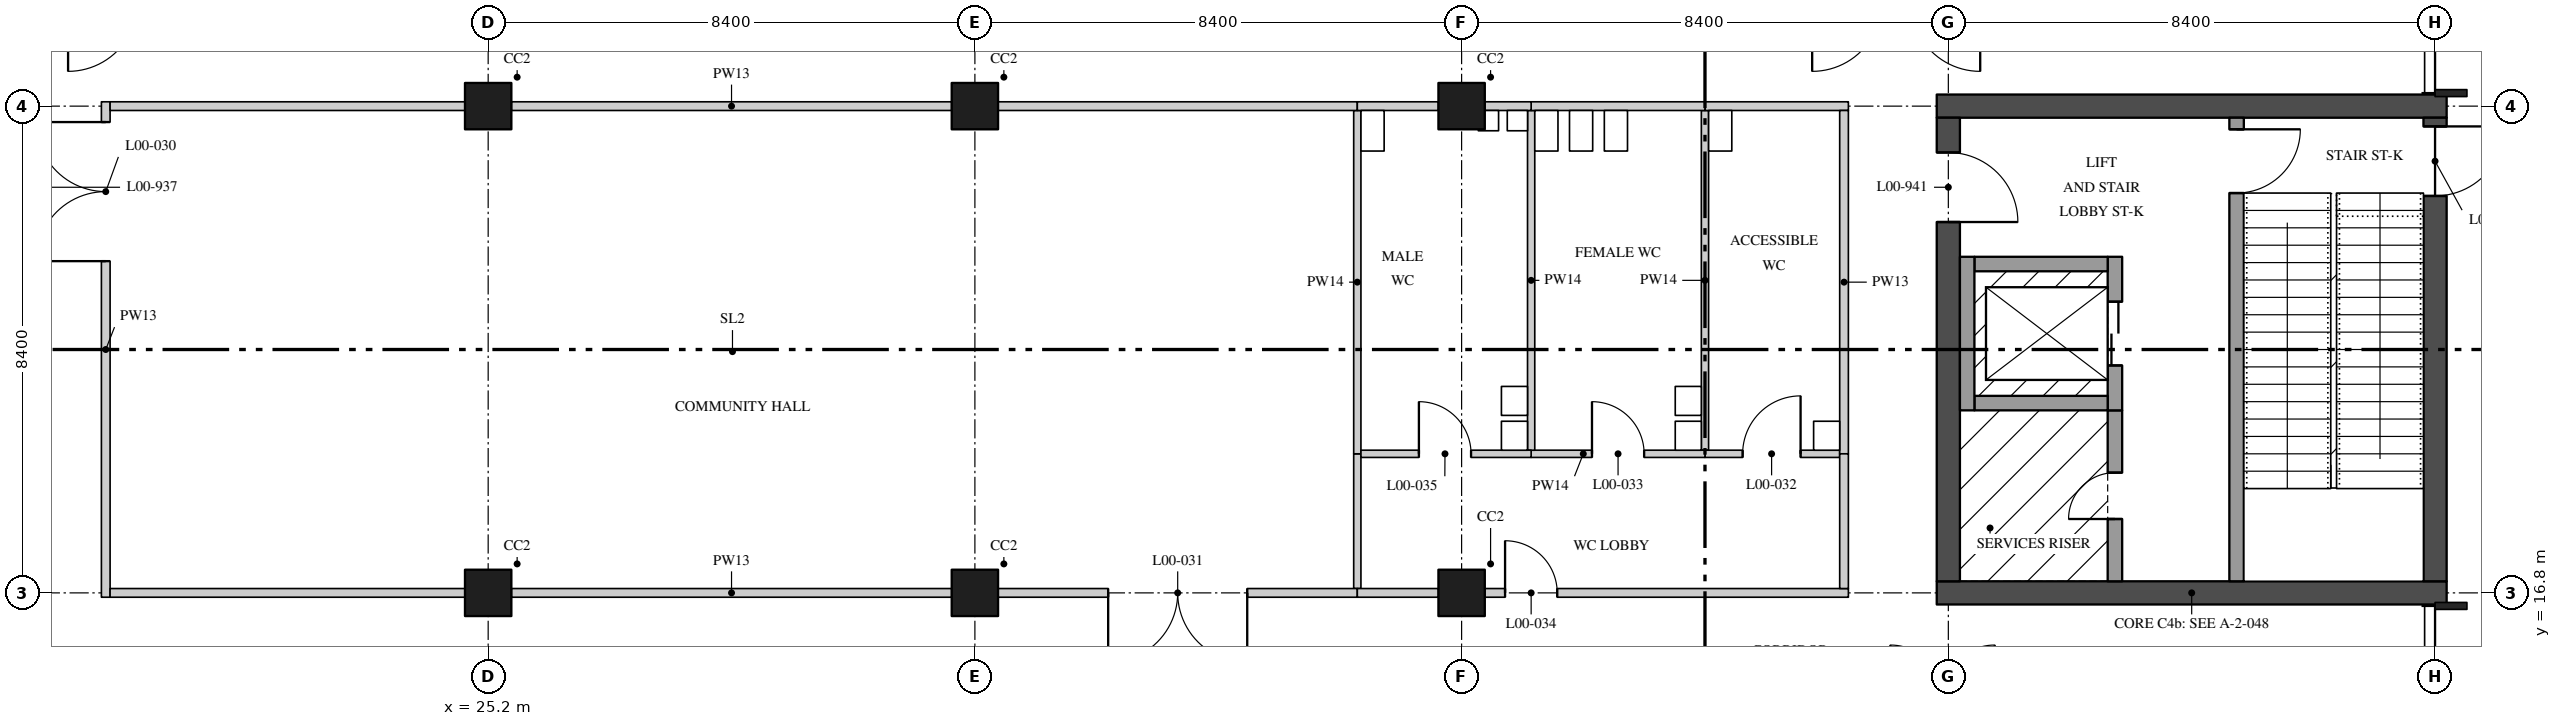
"""IFC4 building model, lengths in metres.
Left out: names, types, materials, properties, quantities, classifications, styles, units other than length and angle.
Written with IfcOpenShell. Run it as: python <this file> out.ifc"""

import sys

from ifc_helpers import new_model, si_unit, direction, frame, frame_2d, origin, origin_2d, place, context, subcontext, project, spatial, rectangle, extrude, element, fill, save


model = new_model("IFC4")
c1 = context("Model", 3, precision=1e-05, world=origin(), true_north=direction((0.0, 1.0)))
c2 = subcontext(c1, "Body", "Model", "MODEL_VIEW")
j1 = project(units=[si_unit("LENGTHUNIT", "METRE"), si_unit("PLANEANGLEUNIT", "RADIAN")], contexts=[c1])
p1 = place(None, origin())
s1 = spatial("IfcSite", under=j1, at=p1, CompositionType="ELEMENT")
p2 = place(p1, origin())
s2 = spatial("IfcBuilding", under=s1, at=p2, CompositionType="ELEMENT")
p3 = place(p2, origin())
s3 = spatial("IfcBuildingStorey", under=s2, at=p3, CompositionType="ELEMENT", Elevation=0.0)
for number, where, z_axis, x_axis in (
    (1, (25.2, 16.8, 0.0), (0.0, 0.0, 1.0), (1.0, 0.0, 0.0)),
    (2, (25.2, 25.2, 0.0), (0.0, 0.0, 1.0), (1.0, 0.0, 0.0)),
    (3, (33.6, 16.8, 0.0), (0.0, 0.0, 1.0), (1.0, 0.0, 0.0)),
    (4, (33.6, 25.2, 0.0), (0.0, 0.0, 1.0), (1.0, 0.0, 0.0)),
    (5, (42.0, 16.8, 0.0), (0.0, 0.0, 1.0), (1.0, 0.0, 0.0)),
    (6, (42.0, 25.2, 0.0), (0.0, 0.0, 1.0), (1.0, 0.0, 0.0)),
):
    element("IfcColumn", number, at=place(p3, frame(where, z_axis=z_axis, x_axis=x_axis)), inside=s3, PredefinedType="COLUMN", context=c2, shape_type="SweptSolid", body=[
        extrude(rectangle(XDim=0.8, YDim=0.8, at=origin_2d()), origin(), (0.0, 0.0, 1.0), 5.05),
    ])
for number, where, z_axis, x_axis in (
    (7, (50.2, 16.8, 0.0), (0.0, 0.0, 1.0), (1.0, 0.0, 0.0)),
    (8, (50.2, 25.2, 0.0), (0.0, 0.0, 1.0), (1.0, 0.0, 0.0)),
):
    element("IfcWall", number, at=place(p3, frame(where, z_axis=z_axis, x_axis=x_axis)), inside=s3, PredefinedType="SHEAR", context=c2, shape_type="SweptSolid", body=[
        extrude(rectangle(XDim=8.8, YDim=0.4, at=frame_2d((4.4, 0.0))), origin(), (0.0, 0.0, 1.0), 5.05),
    ])
p4 = place(p3, frame((50.4, 17.0, 0.0), z_axis=(0.0, 0.0, 1.0), x_axis=(0.0, 1.0, 0.0)))
e9 = element("IfcWall", 9, at=p4, inside=s3, PredefinedType="SHEAR", context=c2, shape_type="SweptSolid", body=[
    extrude(rectangle(XDim=8.0, YDim=0.4, at=frame_2d((4.0, 0.0))), origin(), (0.0, 0.0, 1.0), 5.05),
])
p5 = place(p4, frame((6.2, 0.0, 0.0)))
e10 = element("IfcOpeningElement", 10, at=p5, cuts=e9, PredefinedType="OPENING", context=c2, shape_type="SweptSolid", body=[
    extrude(rectangle(XDim=1.2, YDim=2.1, at=frame_2d((0.6, 1.05))), frame((0.0, 0.21, 0.0), z_axis=(0.0, -1.0, 0.0), x_axis=(1.0, 0.0, 0.0)), (0.0, 0.0, 1.0), 0.42),
])
p6 = place(p3, frame((58.8, 17.0, 0.0), z_axis=(0.0, 0.0, 1.0), x_axis=(0.0, 1.0, 0.0)))
e11 = element("IfcWall", 11, at=p6, inside=s3, PredefinedType="SHEAR", context=c2, shape_type="SweptSolid", body=[
    extrude(rectangle(XDim=8.0, YDim=0.4, at=frame_2d((4.0, 0.0))), origin(), (0.0, 0.0, 1.0), 5.05),
])
p7 = place(p6, frame((6.65, 0.0, 0.0)))
e12 = element("IfcOpeningElement", 12, at=p7, cuts=e11, PredefinedType="OPENING", context=c2, shape_type="SweptSolid", body=[
    extrude(rectangle(XDim=1.2, YDim=2.1, at=frame_2d((0.6, 1.05))), frame((0.0, 0.21, 0.0), z_axis=(0.0, -1.0, 0.0), x_axis=(1.0, 0.0, 0.0)), (0.0, 0.0, 1.0), 0.42),
])
p8 = place(p3, frame((55.375, 25.0, 0.0), z_axis=(0.0, 0.0, 1.0), x_axis=(0.0, -1.0, 0.0)))
e13 = element("IfcWall", 13, at=p8, inside=s3, PredefinedType="SOLIDWALL", context=c2, shape_type="SweptSolid", body=[
    extrude(rectangle(XDim=8.0, YDim=0.25, at=frame_2d((4.0, 0.0))), origin(), (0.0, 0.0, 1.0), 5.05),
])
p9 = place(p8, frame((0.2, 0.0, 0.0)))
e14 = element("IfcOpeningElement", 14, at=p9, cuts=e13, PredefinedType="OPENING", context=c2, shape_type="SweptSolid", body=[
    extrude(rectangle(XDim=1.1, YDim=2.1, at=frame_2d((0.55, 1.05))), frame((0.0, 0.135, 0.0), z_axis=(0.0, -1.0, 0.0), x_axis=(1.0, 0.0, 0.0)), (0.0, 0.0, 1.0), 0.27),
])
p10 = place(p3, frame((53.275, 19.95, 0.0), z_axis=(0.0, 0.0, 1.0), x_axis=(0.0, -1.0, 0.0)))
e15 = element("IfcWall", 15, at=p10, inside=s3, PredefinedType="SOLIDWALL", context=c2, shape_type="SweptSolid", body=[
    extrude(rectangle(XDim=2.95, YDim=0.25, at=frame_2d((1.475, 0.0))), origin(), (0.0, 0.0, 1.0), 5.05),
])
p11 = place(p10, frame((1.075, 0.0, 0.0)))
e16 = element("IfcOpeningElement", 16, at=p11, cuts=e15, PredefinedType="OPENING", context=c2, shape_type="SweptSolid", body=[
    extrude(rectangle(XDim=0.8, YDim=2.1, at=frame_2d((0.4, 1.05))), frame((0.0, 0.135, 0.0), z_axis=(0.0, -1.0, 0.0), x_axis=(1.0, 0.0, 0.0)), (0.0, 0.0, 1.0), 0.27),
])
p12 = place(p3, frame((53.275, 19.95, 0.0), z_axis=(0.0, 0.0, 1.0), x_axis=(0.0, 1.0, 0.0)))
e17 = element("IfcWall", 17, at=p12, inside=s3, PredefinedType="SOLIDWALL", context=c2, shape_type="SweptSolid", body=[
    extrude(rectangle(XDim=2.65, YDim=0.25, at=frame_2d((1.325, 0.0))), origin(), (0.0, 0.0, 1.0), 5.05),
])
p13 = place(p12, frame((0.775, 0.0, 0.0)))
e18 = element("IfcOpeningElement", 18, at=p13, cuts=e17, PredefinedType="OPENING", context=c2, shape_type="SweptSolid", body=[
    extrude(rectangle(XDim=1.1, YDim=2.1, at=frame_2d((0.55, 1.05))), frame((0.0, 0.135, 0.0), z_axis=(0.0, -1.0, 0.0), x_axis=(1.0, 0.0, 0.0)), (0.0, 0.0, 1.0), 0.27),
])
for number, where, z_axis, x_axis in (
    (19, (50.85, 22.475, 0.0), (0.0, 0.0, 1.0), (1.0, 0.0, 0.0)),
    (20, (50.85, 20.075, 0.0), (0.0, 0.0, 1.0), (1.0, 0.0, 0.0)),
):
    element("IfcWall", number, at=place(p3, frame(where, z_axis=z_axis, x_axis=x_axis)), inside=s3, PredefinedType="SOLIDWALL", context=c2, shape_type="SweptSolid", body=[
        extrude(rectangle(XDim=2.3, YDim=0.25, at=frame_2d((1.15, 0.0))), origin(), (0.0, 0.0, 1.0), 5.05),
    ])
p14 = place(p3, frame((50.725, 19.95, 0.0), z_axis=(0.0, 0.0, 1.0), x_axis=(0.0, 1.0, 0.0)))
e21 = element("IfcWall", 21, at=p14, inside=s3, PredefinedType="SOLIDWALL", context=c2, shape_type="SweptSolid", body=[
    extrude(rectangle(XDim=2.65, YDim=0.25, at=frame_2d((1.325, 0.0))), origin(), (0.0, 0.0, 1.0), 5.05),
])
p15 = place(p3, frame((40.2, 16.875, 0.0), z_axis=(0.0, 0.0, 1.0), x_axis=(0.0, 1.0, 0.0)))
e22 = element("IfcWall", 22, at=p15, inside=s3, PredefinedType="PARTITIONING", context=c2, shape_type="SweptSolid", body=[
    extrude(rectangle(XDim=2.325, YDim=0.125, at=frame_2d((1.163, 0.0))), origin(), (0.0, 0.0, 1.0), 5.05),
])
p16 = place(p3, frame((40.2, 19.2, 0.0), z_axis=(0.0, 0.0, 1.0), x_axis=(0.0, 1.0, 0.0)))
e23 = element("IfcWall", 23, at=p16, inside=s3, PredefinedType="PARTITIONING", context=c2, shape_type="SweptSolid", body=[
    extrude(rectangle(XDim=5.925, YDim=0.125, at=frame_2d((2.962, 0.0))), origin(), (0.0, 0.0, 1.0), 5.05),
])
p17 = place(p3, frame((18.6, 16.725, 0.0), z_axis=(0.0, 0.0, 1.0), x_axis=(0.0, 1.0, 0.0)))
e24 = element("IfcWall", 24, at=p17, inside=s3, PredefinedType="PARTITIONING", context=c2, shape_type="SweptSolid", body=[
    extrude(rectangle(XDim=8.55, YDim=0.15, at=frame_2d((4.275, 0.0))), origin(), (0.0, 0.0, 1.0), 5.05),
])
p18 = place(p17, frame((5.8, 0.0, 0.0)))
e25 = element("IfcOpeningElement", 25, at=p18, cuts=e24, PredefinedType="OPENING", context=c2, shape_type="SweptSolid", body=[
    extrude(rectangle(XDim=2.4, YDim=2.7, at=frame_2d((1.2, 1.35))), frame((0.0, 0.085, 0.0), z_axis=(0.0, -1.0, 0.0), x_axis=(1.0, 0.0, 0.0)), (0.0, 0.0, 1.0), 0.17),
])
p19 = place(p3, frame((18.675, 16.8, 0.0), z_axis=(0.0, 0.0, 1.0), x_axis=(1.0, 0.0, 0.0)))
e26 = element("IfcWall", 26, at=p19, inside=s3, PredefinedType="PARTITIONING", context=c2, shape_type="SweptSolid", body=[
    extrude(rectangle(XDim=6.125, YDim=0.15, at=frame_2d((3.062, 0.0))), origin(), (0.0, 0.0, 1.0), 5.05),
])
p20 = place(p3, frame((25.6, 16.8, 0.0), z_axis=(0.0, 0.0, 1.0), x_axis=(1.0, 0.0, 0.0)))
e27 = element("IfcWall", 27, at=p20, inside=s3, PredefinedType="PARTITIONING", context=c2, shape_type="SweptSolid", body=[
    extrude(rectangle(XDim=7.6, YDim=0.15, at=frame_2d((3.8, 0.0))), origin(), (0.0, 0.0, 1.0), 5.05),
])
p21 = place(p3, frame((34.0, 16.8, 0.0), z_axis=(0.0, 0.0, 1.0), x_axis=(1.0, 0.0, 0.0)))
e28 = element("IfcWall", 28, at=p21, inside=s3, PredefinedType="PARTITIONING", context=c2, shape_type="SweptSolid", body=[
    extrude(rectangle(XDim=6.2, YDim=0.15, at=frame_2d((3.1, 0.0))), origin(), (0.0, 0.0, 1.0), 5.05),
])
p22 = place(p21, frame((1.9, 0.0, 0.0)))
e29 = element("IfcOpeningElement", 29, at=p22, cuts=e28, PredefinedType="OPENING", context=c2, shape_type="SweptSolid", body=[
    extrude(rectangle(XDim=2.4, YDim=2.7, at=frame_2d((1.2, 1.35))), frame((0.0, 0.085, 0.0), z_axis=(0.0, -1.0, 0.0), x_axis=(1.0, 0.0, 0.0)), (0.0, 0.0, 1.0), 0.17),
])
p23 = place(p3, frame((18.675, 25.2, 0.0), z_axis=(0.0, 0.0, 1.0), x_axis=(1.0, 0.0, 0.0)))
e30 = element("IfcWall", 30, at=p23, inside=s3, PredefinedType="PARTITIONING", context=c2, shape_type="SweptSolid", body=[
    extrude(rectangle(XDim=6.125, YDim=0.15, at=frame_2d((3.062, 0.0))), origin(), (0.0, 0.0, 1.0), 5.05),
])
p24 = place(p3, frame((25.6, 25.2, 0.0), z_axis=(0.0, 0.0, 1.0), x_axis=(1.0, 0.0, 0.0)))
e31 = element("IfcWall", 31, at=p24, inside=s3, PredefinedType="PARTITIONING", context=c2, shape_type="SweptSolid", body=[
    extrude(rectangle(XDim=7.6, YDim=0.15, at=frame_2d((3.8, 0.0))), origin(), (0.0, 0.0, 1.0), 5.05),
])
p25 = place(p3, frame((34.0, 25.2, 0.0), z_axis=(0.0, 0.0, 1.0), x_axis=(1.0, 0.0, 0.0)))
e32 = element("IfcWall", 32, at=p25, inside=s3, PredefinedType="PARTITIONING", context=c2, shape_type="SweptSolid", body=[
    extrude(rectangle(XDim=6.2, YDim=0.15, at=frame_2d((3.1, 0.0))), origin(), (0.0, 0.0, 1.0), 5.05),
])
p26 = place(p3, frame((46.2, 19.262, 0.0), z_axis=(0.0, 0.0, 1.0), x_axis=(0.0, 1.0, 0.0)))
e33 = element("IfcWall", 33, at=p26, inside=s3, PredefinedType="PARTITIONING", context=c2, shape_type="SweptSolid", body=[
    extrude(rectangle(XDim=5.863, YDim=0.125, at=frame_2d((2.932, 0.0))), origin(), (0.0, 0.0, 1.0), 5.05),
])
p27 = place(p3, frame((46.2, 19.2, 0.0), z_axis=(0.0, 0.0, 1.0), x_axis=(1.0, 0.0, 0.0)))
e34 = element("IfcWall", 34, at=p27, inside=s3, PredefinedType="PARTITIONING", context=c2, shape_type="SweptSolid", body=[
    extrude(rectangle(XDim=2.325, YDim=0.125, at=frame_2d((1.163, 0.0))), origin(), (0.0, 0.0, 1.0), 5.05),
])
p28 = place(p27, frame((0.65, 0.0, 0.0)))
e35 = element("IfcOpeningElement", 35, at=p28, cuts=e34, PredefinedType="OPENING", context=c2, shape_type="SweptSolid", body=[
    extrude(rectangle(XDim=1.0, YDim=2.1, at=frame_2d((0.5, 1.05))), frame((0.0, 0.073, 0.0), z_axis=(0.0, -1.0, 0.0), x_axis=(1.0, 0.0, 0.0)), (0.0, 0.0, 1.0), 0.145),
])
p29 = place(p3, frame((46.2, 25.2, 0.0), z_axis=(0.0, 0.0, 1.0), x_axis=(1.0, 0.0, 0.0)))
e36 = element("IfcWall", 36, at=p29, inside=s3, PredefinedType="PARTITIONING", context=c2, shape_type="SweptSolid", body=[
    extrude(rectangle(XDim=2.475, YDim=0.15, at=frame_2d((1.238, 0.0))), origin(), (0.0, 0.0, 1.0), 5.05),
])
p30 = place(p3, frame((48.6, 19.2, 0.0), z_axis=(0.0, 0.0, 1.0), x_axis=(0.0, 1.0, 0.0)))
e37 = element("IfcWall", 37, at=p30, inside=s3, PredefinedType="PARTITIONING", context=c2, shape_type="SweptSolid", body=[
    extrude(rectangle(XDim=5.925, YDim=0.15, at=frame_2d((2.962, 0.0))), origin(), (0.0, 0.0, 1.0), 5.05),
])
p31 = place(p3, frame((43.2, 19.2, 0.0), z_axis=(0.0, 0.0, 1.0), x_axis=(1.0, 0.0, 0.0)))
e38 = element("IfcWall", 38, at=p31, inside=s3, PredefinedType="PARTITIONING", context=c2, shape_type="SweptSolid", body=[
    extrude(rectangle(XDim=3.0, YDim=0.125, at=frame_2d((1.5, 0.0))), origin(), (0.0, 0.0, 1.0), 5.05),
])
p32 = place(p31, frame((1.05, 0.0, 0.0)))
e39 = element("IfcOpeningElement", 39, at=p32, cuts=e38, PredefinedType="OPENING", context=c2, shape_type="SweptSolid", body=[
    extrude(rectangle(XDim=0.9, YDim=2.1, at=frame_2d((0.45, 1.05))), frame((0.0, 0.073, 0.0), z_axis=(0.0, -1.0, 0.0), x_axis=(1.0, 0.0, 0.0)), (0.0, 0.0, 1.0), 0.145),
])
p33 = place(p3, frame((43.2, 19.262, 0.0), z_axis=(0.0, 0.0, 1.0), x_axis=(0.0, 1.0, 0.0)))
e40 = element("IfcWall", 40, at=p33, inside=s3, PredefinedType="PARTITIONING", context=c2, shape_type="SweptSolid", body=[
    extrude(rectangle(XDim=5.863, YDim=0.125, at=frame_2d((2.932, 0.0))), origin(), (0.0, 0.0, 1.0), 5.05),
])
p34 = place(p3, frame((43.2, 25.2, 0.0), z_axis=(0.0, 0.0, 1.0), x_axis=(1.0, 0.0, 0.0)))
e41 = element("IfcWall", 41, at=p34, inside=s3, PredefinedType="PARTITIONING", context=c2, shape_type="SweptSolid", body=[
    extrude(rectangle(XDim=3.0, YDim=0.15, at=frame_2d((1.5, 0.0))), origin(), (0.0, 0.0, 1.0), 5.05),
])
p35 = place(p3, frame((40.263, 19.2, 0.0), z_axis=(0.0, 0.0, 1.0), x_axis=(1.0, 0.0, 0.0)))
e42 = element("IfcWall", 42, at=p35, inside=s3, PredefinedType="PARTITIONING", context=c2, shape_type="SweptSolid", body=[
    extrude(rectangle(XDim=2.937, YDim=0.125, at=frame_2d((1.469, 0.0))), origin(), (0.0, 0.0, 1.0), 5.05),
])
p36 = place(p35, frame((1.0, 0.0, 0.0)))
e43 = element("IfcOpeningElement", 43, at=p36, cuts=e42, PredefinedType="OPENING", context=c2, shape_type="SweptSolid", body=[
    extrude(rectangle(XDim=0.9, YDim=2.1, at=frame_2d((0.45, 1.05))), frame((0.0, 0.073, 0.0), z_axis=(0.0, -1.0, 0.0), x_axis=(1.0, 0.0, 0.0)), (0.0, 0.0, 1.0), 0.145),
])
p37 = place(p3, frame((40.2, 16.8, 0.0), z_axis=(0.0, 0.0, 1.0), x_axis=(1.0, 0.0, 0.0)))
e44 = element("IfcWall", 44, at=p37, inside=s3, PredefinedType="PARTITIONING", context=c2, shape_type="SweptSolid", body=[
    extrude(rectangle(XDim=1.4, YDim=0.15, at=frame_2d((0.7, 0.0))), origin(), (0.0, 0.0, 1.0), 5.05),
])
p38 = place(p3, frame((42.4, 16.8, 0.0), z_axis=(0.0, 0.0, 1.0), x_axis=(1.0, 0.0, 0.0)))
e45 = element("IfcWall", 45, at=p38, inside=s3, PredefinedType="PARTITIONING", context=c2, shape_type="SweptSolid", body=[
    extrude(rectangle(XDim=6.275, YDim=0.15, at=frame_2d((3.138, 0.0))), origin(), (0.0, 0.0, 1.0), 5.05),
])
p39 = place(p38, frame((0.35, 0.0, 0.0)))
e46 = element("IfcOpeningElement", 46, at=p39, cuts=e45, PredefinedType="OPENING", context=c2, shape_type="SweptSolid", body=[
    extrude(rectangle(XDim=0.9, YDim=2.1, at=frame_2d((0.45, 1.05))), frame((0.0, 0.085, 0.0), z_axis=(0.0, -1.0, 0.0), x_axis=(1.0, 0.0, 0.0)), (0.0, 0.0, 1.0), 0.17),
])
p40 = place(p3, frame((48.6, 16.875, 0.0), z_axis=(0.0, 0.0, 1.0), x_axis=(0.0, 1.0, 0.0)))
e47 = element("IfcWall", 47, at=p40, inside=s3, PredefinedType="PARTITIONING", context=c2, shape_type="SweptSolid", body=[
    extrude(rectangle(XDim=2.325, YDim=0.15, at=frame_2d((1.163, 0.0))), origin(), (0.0, 0.0, 1.0), 5.05),
])
p41 = place(p3, frame((40.2, 25.2, 0.0), z_axis=(0.0, 0.0, 1.0), x_axis=(1.0, 0.0, 0.0)))
e48 = element("IfcWall", 48, at=p41, inside=s3, PredefinedType="PARTITIONING", context=c2, shape_type="SweptSolid", body=[
    extrude(rectangle(XDim=1.4, YDim=0.15, at=frame_2d((0.7, 0.0))), origin(), (0.0, 0.0, 1.0), 5.05),
])
p42 = place(p3, frame((42.4, 25.2, 0.0), z_axis=(0.0, 0.0, 1.0), x_axis=(1.0, 0.0, 0.0)))
e49 = element("IfcWall", 49, at=p42, inside=s3, PredefinedType="PARTITIONING", context=c2, shape_type="SweptSolid", body=[
    extrude(rectangle(XDim=0.8, YDim=0.15, at=frame_2d((0.4, 0.0))), origin(), (0.0, 0.0, 1.0), 5.05),
])
p43 = place(p5, frame((1.2, 0.0, 0.0), z_axis=(0.0, 0.0, 1.0), x_axis=(-1.0, 0.0, 0.0)))
e50 = element("IfcDoor", 50, at=p43, inside=s3, OperationType="SINGLE_SWING_LEFT", PredefinedType="DOOR", context=c2, shape_type="SweptSolid", body=[
    extrude(rectangle(XDim=1.2, YDim=2.1, at=frame_2d((0.6, 1.05))), frame((0.0, 0.035, 0.0), z_axis=(0.0, -1.0, 0.0), x_axis=(1.0, 0.0, 0.0)), (0.0, 0.0, 1.0), 0.07),
])
fill(e10, e50)
p44 = place(p11, frame((0.8, 0.0, 0.0), z_axis=(0.0, 0.0, 1.0), x_axis=(-1.0, 0.0, 0.0)))
e51 = element("IfcDoor", 51, at=p44, inside=s3, OperationType="SINGLE_SWING_RIGHT", PredefinedType="DOOR", context=c2, shape_type="SweptSolid", body=[
    extrude(rectangle(XDim=0.8, YDim=2.1, at=frame_2d((0.4, 1.05))), frame((0.0, 0.035, 0.0), z_axis=(0.0, -1.0, 0.0), x_axis=(1.0, 0.0, 0.0)), (0.0, 0.0, 1.0), 0.07),
])
fill(e16, e51)
p45 = place(p9, origin())
e52 = element("IfcDoor", 52, at=p45, inside=s3, OperationType="SINGLE_SWING_RIGHT", PredefinedType="DOOR", context=c2, shape_type="SweptSolid", body=[
    extrude(rectangle(XDim=1.1, YDim=2.1, at=frame_2d((0.55, 1.05))), frame((0.0, 0.035, 0.0), z_axis=(0.0, -1.0, 0.0), x_axis=(1.0, 0.0, 0.0)), (0.0, 0.0, 1.0), 0.07),
])
fill(e14, e52)
p46 = place(p7, frame((1.2, 0.0, 0.0), z_axis=(0.0, 0.0, 1.0), x_axis=(-1.0, 0.0, 0.0)))
e53 = element("IfcDoor", 53, at=p46, inside=s3, OperationType="SINGLE_SWING_RIGHT", PredefinedType="DOOR", context=c2, shape_type="SweptSolid", body=[
    extrude(rectangle(XDim=1.2, YDim=2.1, at=frame_2d((0.6, 1.05))), frame((0.0, 0.035, 0.0), z_axis=(0.0, -1.0, 0.0), x_axis=(1.0, 0.0, 0.0)), (0.0, 0.0, 1.0), 0.07),
])
fill(e12, e53)
p47 = place(p13, origin())
e54 = element("IfcDoor", 54, at=p47, inside=s3, OperationType="DOUBLE_DOOR_SLIDING", PredefinedType="DOOR", context=c2, shape_type="SweptSolid", body=[
    extrude(rectangle(XDim=1.1, YDim=2.1, at=frame_2d((0.55, 1.05))), frame((0.0, 0.04, 0.0), z_axis=(0.0, -1.0, 0.0), x_axis=(1.0, 0.0, 0.0)), (0.0, 0.0, 1.0), 0.08),
])
fill(e18, e54)
p48 = place(p18, origin())
e55 = element("IfcDoor", 55, at=p48, inside=s3, OperationType="DOUBLE_DOOR_SINGLE_SWING", PredefinedType="DOOR", context=c2, shape_type="SweptSolid", body=[
    extrude(rectangle(XDim=2.4, YDim=2.7, at=frame_2d((1.2, 1.35))), frame((0.0, 0.025, 0.0), z_axis=(0.0, -1.0, 0.0), x_axis=(1.0, 0.0, 0.0)), (0.0, 0.0, 1.0), 0.05),
])
fill(e25, e55)
p49 = place(p22, frame((2.4, 0.0, 0.0), z_axis=(0.0, 0.0, 1.0), x_axis=(-1.0, 0.0, 0.0)))
e56 = element("IfcDoor", 56, at=p49, inside=s3, OperationType="DOUBLE_DOOR_SINGLE_SWING", PredefinedType="DOOR", context=c2, shape_type="SweptSolid", body=[
    extrude(rectangle(XDim=2.4, YDim=2.7, at=frame_2d((1.2, 1.35))), frame((0.0, 0.025, 0.0), z_axis=(0.0, -1.0, 0.0), x_axis=(1.0, 0.0, 0.0)), (0.0, 0.0, 1.0), 0.05),
])
fill(e29, e56)
p50 = place(p28, origin())
e57 = element("IfcDoor", 57, at=p50, inside=s3, OperationType="SINGLE_SWING_LEFT", PredefinedType="DOOR", context=c2, shape_type="SweptSolid", body=[
    extrude(rectangle(XDim=1.0, YDim=2.1, at=frame_2d((0.5, 1.05))), frame((0.0, 0.02, 0.0), z_axis=(0.0, -1.0, 0.0), x_axis=(1.0, 0.0, 0.0)), (0.0, 0.0, 1.0), 0.04),
])
fill(e35, e57)
p51 = place(p32, origin())
e58 = element("IfcDoor", 58, at=p51, inside=s3, OperationType="SINGLE_SWING_RIGHT", PredefinedType="DOOR", context=c2, shape_type="SweptSolid", body=[
    extrude(rectangle(XDim=0.9, YDim=2.1, at=frame_2d((0.45, 1.05))), frame((0.0, 0.02, 0.0), z_axis=(0.0, -1.0, 0.0), x_axis=(1.0, 0.0, 0.0)), (0.0, 0.0, 1.0), 0.04),
])
fill(e39, e58)
p52 = place(p39, origin())
e59 = element("IfcDoor", 59, at=p52, inside=s3, OperationType="SINGLE_SWING_RIGHT", PredefinedType="DOOR", context=c2, shape_type="SweptSolid", body=[
    extrude(rectangle(XDim=0.9, YDim=2.1, at=frame_2d((0.45, 1.05))), frame((0.0, 0.025, 0.0), z_axis=(0.0, -1.0, 0.0), x_axis=(1.0, 0.0, 0.0)), (0.0, 0.0, 1.0), 0.05),
])
fill(e46, e59)
p53 = place(p36, origin())
e60 = element("IfcDoor", 60, at=p53, inside=s3, OperationType="SINGLE_SWING_RIGHT", PredefinedType="DOOR", context=c2, shape_type="SweptSolid", body=[
    extrude(rectangle(XDim=0.9, YDim=2.1, at=frame_2d((0.45, 1.05))), frame((0.0, 0.02, 0.0), z_axis=(0.0, -1.0, 0.0), x_axis=(1.0, 0.0, 0.0)), (0.0, 0.0, 1.0), 0.04),
])
fill(e43, e60)
save(model, sys.argv[1])
